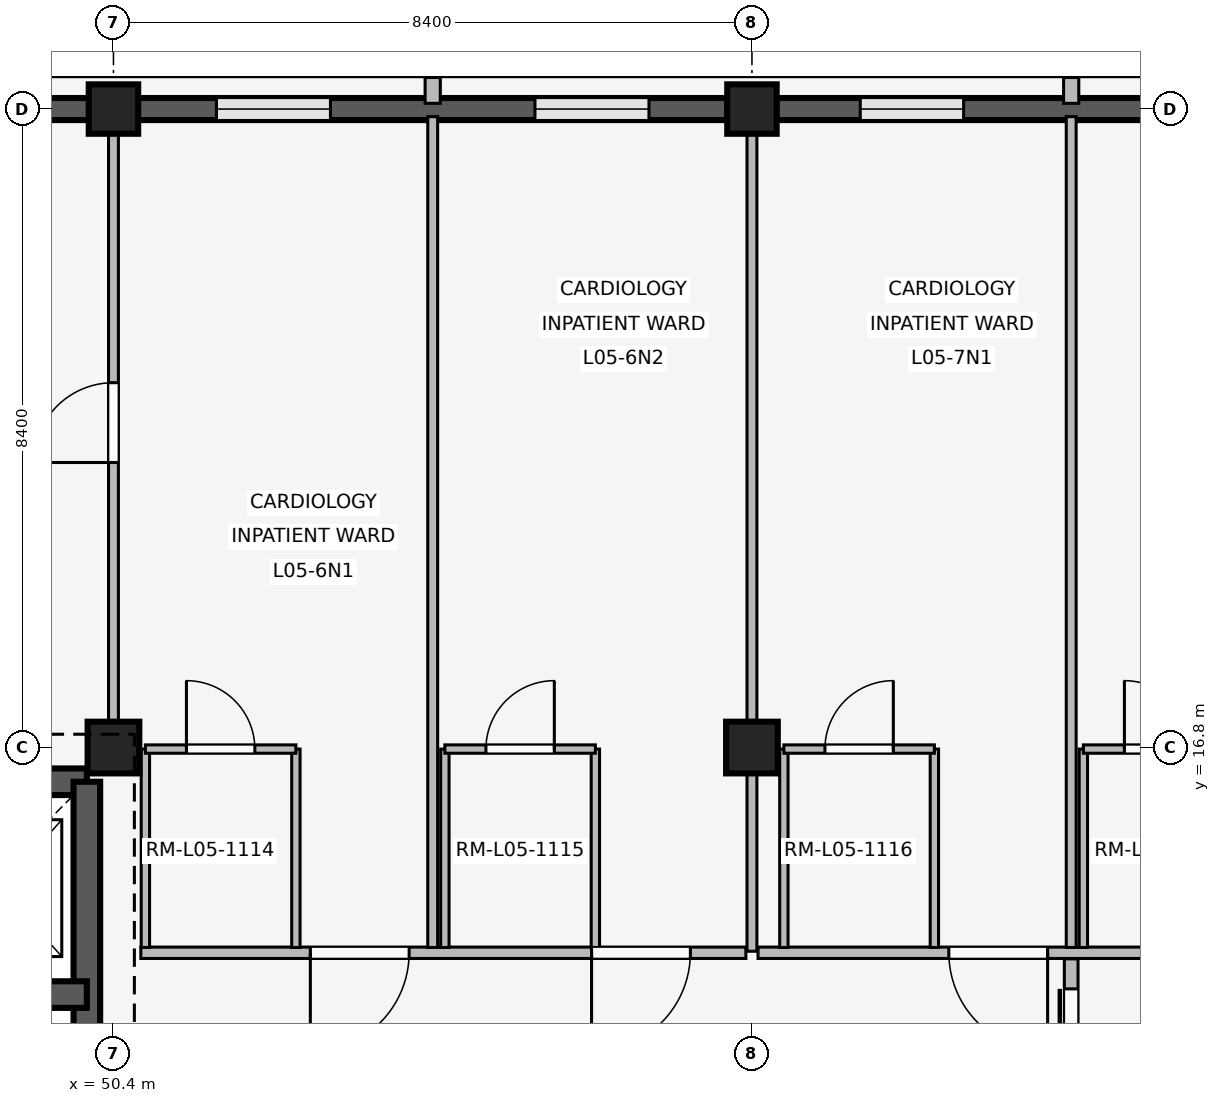
"""IFC4 building model, lengths in metres.
Left out: names, types, materials, properties, quantities, classifications, styles, units other than length and angle.
Written with IfcOpenShell. Run it as: python <this file> out.ifc"""

import sys

from ifc_helpers import new_model, si_unit, direction, frame, frame_2d, origin, origin_2d, place, context, subcontext, project, spatial, rectangle, extrude, element, fill, save


model = new_model("IFC4")
c1 = context("Model", 3, precision=1e-05, world=origin(), true_north=direction((0.0, 1.0)))
c2 = subcontext(c1, "Body", "Model", "MODEL_VIEW")
j1 = project(units=[si_unit("LENGTHUNIT", "METRE"), si_unit("PLANEANGLEUNIT", "RADIAN")], contexts=[c1])
p1 = place(None, origin())
s1 = spatial("IfcSite", under=j1, at=p1, CompositionType="ELEMENT")
p2 = place(p1, origin())
s2 = spatial("IfcBuilding", under=s1, at=p2, CompositionType="ELEMENT")
p3 = place(p2, frame((0.0, 0.0, 20.4)))
s3 = spatial("IfcBuildingStorey", under=s2, at=p3, CompositionType="ELEMENT", Elevation=20.4)
p4 = place(p3, frame((50.4, 16.8, 0.0), z_axis=(0.0, 0.0, 1.0), x_axis=(1.0, 0.0, 0.0)))
e1 = element("IfcColumn", 1, at=p4, inside=s3, PredefinedType="COLUMN", context=c2, shape_type="SweptSolid", body=[
    extrude(rectangle(XDim=0.68, YDim=0.68, at=origin_2d()), origin(), (0.0, 0.0, 1.0), 4.2),
])
p5 = place(p3, frame((50.4, 25.2, 0.0), z_axis=(0.0, 0.0, 1.0), x_axis=(1.0, 0.0, 0.0)))
e2 = element("IfcColumn", 2, at=p5, inside=s3, PredefinedType="COLUMN", context=c2, shape_type="SweptSolid", body=[
    extrude(rectangle(XDim=0.65, YDim=0.65, at=origin_2d()), origin(), (0.0, 0.0, 1.0), 4.2),
])
p6 = place(p3, frame((58.8, 16.8, 0.0), z_axis=(0.0, 0.0, 1.0), x_axis=(1.0, 0.0, 0.0)))
e3 = element("IfcColumn", 3, at=p6, inside=s3, PredefinedType="COLUMN", context=c2, shape_type="SweptSolid", body=[
    extrude(rectangle(XDim=0.68, YDim=0.68, at=origin_2d()), origin(), (0.0, 0.0, 1.0), 4.2),
])
p7 = place(p3, frame((58.8, 25.2, 0.0), z_axis=(0.0, 0.0, 1.0), x_axis=(1.0, 0.0, 0.0)))
e4 = element("IfcColumn", 4, at=p7, inside=s3, PredefinedType="COLUMN", context=c2, shape_type="SweptSolid", body=[
    extrude(rectangle(XDim=0.65, YDim=0.65, at=origin_2d()), origin(), (0.0, 0.0, 1.0), 4.2),
])
p8 = place(p3, frame((42.32, 25.2, 0.0), z_axis=(0.0, 0.0, 1.0), x_axis=(1.0, 0.0, 0.0)))
e5 = element("IfcWall", 5, at=p8, inside=s3, PredefinedType="SOLIDWALL", context=c2, shape_type="SweptSolid", body=[
    extrude(rectangle(XDim=7.76, YDim=0.29, at=frame_2d((3.88, 0.0))), origin(), (0.0, 0.0, 1.0), 3.34),
])
p9 = place(p8, frame((1.085, 0.0, 0.85)))
e6 = element("IfcOpeningElement", 6, at=p9, cuts=e5, PredefinedType="OPENING", context=c2, shape_type="SweptSolid", body=[
    extrude(rectangle(XDim=1.4, YDim=1.4, at=frame_2d((0.7, 0.7))), frame((0.0, 0.155, 0.0), z_axis=(0.0, -1.0, 0.0), x_axis=(1.0, 0.0, 0.0)), (0.0, 0.0, 1.0), 0.31),
])
p10 = place(p8, frame((5.275, 0.0, 0.85)))
e7 = element("IfcOpeningElement", 7, at=p10, cuts=e5, PredefinedType="OPENING", context=c2, shape_type="SweptSolid", body=[
    extrude(rectangle(XDim=1.4, YDim=1.4, at=frame_2d((0.7, 0.7))), frame((0.0, 0.155, 0.0), z_axis=(0.0, -1.0, 0.0), x_axis=(1.0, 0.0, 0.0)), (0.0, 0.0, 1.0), 0.31),
])
p11 = place(p3, frame((50.72, 25.2, 0.0), z_axis=(0.0, 0.0, 1.0), x_axis=(1.0, 0.0, 0.0)))
e8 = element("IfcWall", 8, at=p11, inside=s3, PredefinedType="SOLIDWALL", context=c2, shape_type="SweptSolid", body=[
    extrude(rectangle(XDim=7.76, YDim=0.29, at=frame_2d((3.88, 0.0))), origin(), (0.0, 0.0, 1.0), 3.34),
])
p12 = place(p11, frame((1.035, 0.0, 0.85)))
e9 = element("IfcOpeningElement", 9, at=p12, cuts=e8, PredefinedType="OPENING", context=c2, shape_type="SweptSolid", body=[
    extrude(rectangle(XDim=1.5, YDim=1.55, at=frame_2d((0.75, 0.775))), frame((0.0, 0.155, 0.0), z_axis=(0.0, -1.0, 0.0), x_axis=(1.0, 0.0, 0.0)), (0.0, 0.0, 1.0), 0.31),
])
p13 = place(p11, frame((5.225, 0.0, 0.85)))
e10 = element("IfcOpeningElement", 10, at=p13, cuts=e8, PredefinedType="OPENING", context=c2, shape_type="SweptSolid", body=[
    extrude(rectangle(XDim=1.5, YDim=1.55, at=frame_2d((0.75, 0.775))), frame((0.0, 0.155, 0.0), z_axis=(0.0, -1.0, 0.0), x_axis=(1.0, 0.0, 0.0)), (0.0, 0.0, 1.0), 0.31),
])
p14 = place(p3, frame((54.6, 25.275, 0.0), z_axis=(0.0, 0.0, 1.0), x_axis=(0.0, 1.0, 0.0)))
e11 = element("IfcWall", 11, at=p14, inside=s3, PredefinedType="ELEMENTEDWALL", context=c2, shape_type="SweptSolid", body=[
    extrude(rectangle(XDim=0.34, YDim=0.2, at=frame_2d((0.17, 0.0))), origin(), (0.0, 0.0, 1.0), 3.32),
])
p15 = place(p3, frame((59.12, 25.2, 0.0), z_axis=(0.0, 0.0, 1.0), x_axis=(1.0, 0.0, 0.0)))
e12 = element("IfcWall", 12, at=p15, inside=s3, PredefinedType="SOLIDWALL", context=c2, shape_type="SweptSolid", body=[
    extrude(rectangle(XDim=7.76, YDim=0.29, at=frame_2d((3.88, 0.0))), origin(), (0.0, 0.0, 1.0), 3.34),
])
p16 = place(p15, frame((1.105, 0.0, 0.85)))
e13 = element("IfcOpeningElement", 13, at=p16, cuts=e12, PredefinedType="OPENING", context=c2, shape_type="SweptSolid", body=[
    extrude(rectangle(XDim=1.36, YDim=1.42, at=frame_2d((0.68, 0.71))), frame((0.0, 0.155, 0.0), z_axis=(0.0, -1.0, 0.0), x_axis=(1.0, 0.0, 0.0)), (0.0, 0.0, 1.0), 0.31),
])
p17 = place(p15, frame((5.295, 0.0, 0.85)))
e14 = element("IfcOpeningElement", 14, at=p17, cuts=e12, PredefinedType="OPENING", context=c2, shape_type="SweptSolid", body=[
    extrude(rectangle(XDim=1.36, YDim=1.42, at=frame_2d((0.68, 0.71))), frame((0.0, 0.155, 0.0), z_axis=(0.0, -1.0, 0.0), x_axis=(1.0, 0.0, 0.0)), (0.0, 0.0, 1.0), 0.31),
])
p18 = place(p3, frame((63.0, 25.275, 0.0), z_axis=(0.0, 0.0, 1.0), x_axis=(0.0, 1.0, 0.0)))
e15 = element("IfcWall", 15, at=p18, inside=s3, PredefinedType="ELEMENTEDWALL", context=c2, shape_type="SweptSolid", body=[
    extrude(rectangle(XDim=0.34, YDim=0.2, at=frame_2d((0.17, 0.0))), origin(), (0.0, 0.0, 1.0), 3.32),
])
p19 = place(p3, frame((42.55, 16.35, 0.0), z_axis=(0.0, 0.0, 1.0), x_axis=(1.0, 0.0, 0.0)))
e16 = element("IfcWall", 16, at=p19, inside=s3, PredefinedType="SHEAR", context=c2, shape_type="SweptSolid", body=[
    extrude(rectangle(XDim=7.5, YDim=0.35, at=frame_2d((3.75, 0.0))), origin(), (0.0, 0.0, 1.0), 3.92),
])
p20 = place(p3, frame((50.05, 8.8, 0.0), z_axis=(0.0, 0.0, 1.0), x_axis=(0.0, 1.0, 0.0)))
e17 = element("IfcWall", 17, at=p20, inside=s3, PredefinedType="SHEAR", context=c2, shape_type="SweptSolid", body=[
    extrude(rectangle(XDim=7.55, YDim=0.35, at=frame_2d((3.775, 0.0))), origin(), (0.0, 0.0, 1.0), 3.92),
])
p21 = place(p20, frame((2.4, 0.0, 0.0)))
e18 = element("IfcOpeningElement", 18, at=p21, cuts=e17, PredefinedType="OPENING", context=c2, shape_type="SweptSolid", body=[
    extrude(rectangle(XDim=1.2, YDim=2.2, at=frame_2d((0.6, 1.1))), frame((0.0, 0.185, 0.0), z_axis=(0.0, -1.0, 0.0), x_axis=(1.0, 0.0, 0.0)), (0.0, 0.0, 1.0), 0.37),
])
p22 = place(p3, frame((46.25, 13.55, 0.0), z_axis=(0.0, 0.0, 1.0), x_axis=(1.0, 0.0, 0.0)))
e19 = element("IfcWall", 19, at=p22, inside=s3, PredefinedType="SHEAR", context=c2, shape_type="SweptSolid", body=[
    extrude(rectangle(XDim=3.8, YDim=0.35, at=frame_2d((1.9, 0.0))), origin(), (0.0, 0.0, 1.0), 3.92),
])
p23 = place(p22, frame((0.32, 0.0, 0.0)))
e20 = element("IfcOpeningElement", 20, at=p23, cuts=e19, PredefinedType="OPENING", context=c2, shape_type="SweptSolid", body=[
    extrude(rectangle(XDim=1.4, YDim=2.25, at=frame_2d((0.7, 1.125))), frame((0.0, 0.185, 0.0), z_axis=(0.0, -1.0, 0.0), x_axis=(1.0, 0.0, 0.0)), (0.0, 0.0, 1.0), 0.37),
])
p24 = place(p22, frame((2.04, 0.0, 0.0)))
e21 = element("IfcOpeningElement", 21, at=p24, cuts=e19, PredefinedType="OPENING", context=c2, shape_type="SweptSolid", body=[
    extrude(rectangle(XDim=1.1, YDim=2.15, at=frame_2d((0.55, 1.075))), frame((0.0, 0.185, 0.0), z_axis=(0.0, -1.0, 0.0), x_axis=(1.0, 0.0, 0.0)), (0.0, 0.0, 1.0), 0.37),
])
p25 = place(p3, frame((50.4, 17.15, 0.0), z_axis=(0.0, 0.0, 1.0), x_axis=(0.0, 1.0, 0.0)))
e22 = element("IfcWall", 22, at=p25, inside=s3, PredefinedType="PARTITIONING", context=c2, shape_type="SweptSolid", body=[
    extrude(rectangle(XDim=7.91, YDim=0.13, at=frame_2d((3.955, 0.0))), origin(), (0.0, 0.0, 1.0), 3.32),
])
p26 = place(p25, frame((3.4, 0.0, 0.0)))
e23 = element("IfcOpeningElement", 23, at=p26, cuts=e22, PredefinedType="OPENING", context=c2, shape_type="SweptSolid", body=[
    extrude(rectangle(XDim=1.05, YDim=2.2, at=frame_2d((0.525, 1.1))), frame((0.0, 0.075, 0.0), z_axis=(0.0, -1.0, 0.0), x_axis=(1.0, 0.0, 0.0)), (0.0, 0.0, 1.0), 0.15),
])
p27 = place(p3, frame((58.72, 14.1, 0.0), z_axis=(0.0, 0.0, 1.0), x_axis=(-1.0, 0.0, 0.0)))
e24 = element("IfcWall", 24, at=p27, inside=s3, PredefinedType="PARTITIONING", context=c2, shape_type="SweptSolid", body=[
    extrude(rectangle(XDim=7.96, YDim=0.15, at=frame_2d((3.98, 0.0))), origin(), (0.0, 0.0, 1.0), 3.32),
])
p28 = place(p27, frame((0.73, 0.0, 0.0)))
e25 = element("IfcOpeningElement", 25, at=p28, cuts=e24, PredefinedType="OPENING", context=c2, shape_type="SweptSolid", body=[
    extrude(rectangle(XDim=1.3, YDim=2.25, at=frame_2d((0.65, 1.125))), frame((0.0, 0.085, 0.0), z_axis=(0.0, -1.0, 0.0), x_axis=(1.0, 0.0, 0.0)), (0.0, 0.0, 1.0), 0.17),
])
p29 = place(p27, frame((4.43, 0.0, 0.0)))
e26 = element("IfcOpeningElement", 26, at=p29, cuts=e24, PredefinedType="OPENING", context=c2, shape_type="SweptSolid", body=[
    extrude(rectangle(XDim=1.3, YDim=2.25, at=frame_2d((0.65, 1.125))), frame((0.0, 0.085, 0.0), z_axis=(0.0, -1.0, 0.0), x_axis=(1.0, 0.0, 0.0)), (0.0, 0.0, 1.0), 0.17),
])
p30 = place(p3, frame((54.6, 14.17, 0.0), z_axis=(0.0, 0.0, 1.0), x_axis=(0.0, 1.0, 0.0)))
e27 = element("IfcWall", 27, at=p30, inside=s3, PredefinedType="PARTITIONING", context=c2, shape_type="SweptSolid", body=[
    extrude(rectangle(XDim=10.93, YDim=0.13, at=frame_2d((5.465, 0.0))), origin(), (0.0, 0.0, 1.0), 3.32),
])
for number, where, z_axis, x_axis in (
    (28, (50.82, 14.17, 0.0), (0.0, 0.0, 1.0), (0.0, 1.0, 0.0)),
    (29, (52.8, 14.17, 0.0), (0.0, 0.0, 1.0), (0.0, 1.0, 0.0)),
):
    element("IfcWall", number, at=place(p3, frame(where, z_axis=z_axis, x_axis=x_axis)), inside=s3, PredefinedType="PARTITIONING", context=c2, shape_type="SweptSolid", body=[
        extrude(rectangle(XDim=2.61, YDim=0.11, at=frame_2d((1.305, 0.0))), origin(), (0.0, 0.0, 1.0), 3.32),
    ])
p31 = place(p3, frame((50.82, 16.78, 0.0), z_axis=(0.0, 0.0, 1.0), x_axis=(1.0, 0.0, 0.0)))
e30 = element("IfcWall", 30, at=p31, inside=s3, PredefinedType="PARTITIONING", context=c2, shape_type="SweptSolid", body=[
    extrude(rectangle(XDim=1.98, YDim=0.11, at=frame_2d((0.99, 0.0))), origin(), (0.0, 0.0, 1.0), 3.32),
])
p32 = place(p31, frame((0.54, 0.0, 0.0)))
e31 = element("IfcOpeningElement", 31, at=p32, cuts=e30, PredefinedType="OPENING", context=c2, shape_type="SweptSolid", body=[
    extrude(rectangle(XDim=0.9, YDim=2.1, at=frame_2d((0.45, 1.05))), frame((0.0, 0.065, 0.0), z_axis=(0.0, -1.0, 0.0), x_axis=(1.0, 0.0, 0.0)), (0.0, 0.0, 1.0), 0.13),
])
for number, where, z_axis, x_axis in (
    (32, (54.76, 14.17, 0.0), (0.0, 0.0, 1.0), (0.0, 1.0, 0.0)),
    (33, (56.74, 14.17, 0.0), (0.0, 0.0, 1.0), (0.0, 1.0, 0.0)),
):
    element("IfcWall", number, at=place(p3, frame(where, z_axis=z_axis, x_axis=x_axis)), inside=s3, PredefinedType="PARTITIONING", context=c2, shape_type="SweptSolid", body=[
        extrude(rectangle(XDim=2.61, YDim=0.11, at=frame_2d((1.305, 0.0))), origin(), (0.0, 0.0, 1.0), 3.32),
    ])
p33 = place(p3, frame((54.76, 16.78, 0.0), z_axis=(0.0, 0.0, 1.0), x_axis=(1.0, 0.0, 0.0)))
e34 = element("IfcWall", 34, at=p33, inside=s3, PredefinedType="PARTITIONING", context=c2, shape_type="SweptSolid", body=[
    extrude(rectangle(XDim=1.98, YDim=0.11, at=frame_2d((0.99, 0.0))), origin(), (0.0, 0.0, 1.0), 3.32),
])
p34 = place(p33, frame((0.54, 0.0, 0.0)))
e35 = element("IfcOpeningElement", 35, at=p34, cuts=e34, PredefinedType="OPENING", context=c2, shape_type="SweptSolid", body=[
    extrude(rectangle(XDim=0.9, YDim=2.1, at=frame_2d((0.45, 1.05))), frame((0.0, 0.065, 0.0), z_axis=(0.0, -1.0, 0.0), x_axis=(1.0, 0.0, 0.0)), (0.0, 0.0, 1.0), 0.13),
])
p35 = place(p3, frame((58.8, 14.12, 0.0), z_axis=(0.0, 0.0, 1.0), x_axis=(0.0, 1.0, 0.0)))
e36 = element("IfcWall", 36, at=p35, inside=s3, PredefinedType="PARTITIONING", context=c2, shape_type="SweptSolid", body=[
    extrude(rectangle(XDim=10.94, YDim=0.13, at=frame_2d((5.47, 0.0))), origin(), (0.0, 0.0, 1.0), 3.32),
])
p36 = place(p3, frame((67.12, 14.1, 0.0), z_axis=(0.0, 0.0, 1.0), x_axis=(-1.0, 0.0, 0.0)))
e37 = element("IfcWall", 37, at=p36, inside=s3, PredefinedType="PARTITIONING", context=c2, shape_type="SweptSolid", body=[
    extrude(rectangle(XDim=8.24, YDim=0.15, at=frame_2d((4.12, 0.0))), origin(), (0.0, 0.0, 1.0), 3.32),
])
p37 = place(p36, frame((0.73, 0.0, 0.0)))
e38 = element("IfcOpeningElement", 38, at=p37, cuts=e37, PredefinedType="OPENING", context=c2, shape_type="SweptSolid", body=[
    extrude(rectangle(XDim=1.3, YDim=2.25, at=frame_2d((0.65, 1.125))), frame((0.0, 0.085, 0.0), z_axis=(0.0, -1.0, 0.0), x_axis=(1.0, 0.0, 0.0)), (0.0, 0.0, 1.0), 0.17),
])
p38 = place(p36, frame((4.43, 0.0, 0.0)))
e39 = element("IfcOpeningElement", 39, at=p38, cuts=e37, PredefinedType="OPENING", context=c2, shape_type="SweptSolid", body=[
    extrude(rectangle(XDim=1.3, YDim=2.25, at=frame_2d((0.65, 1.125))), frame((0.0, 0.085, 0.0), z_axis=(0.0, -1.0, 0.0), x_axis=(1.0, 0.0, 0.0)), (0.0, 0.0, 1.0), 0.17),
])
p39 = place(p3, frame((63.0, 14.17, 0.0), z_axis=(0.0, 0.0, 1.0), x_axis=(0.0, 1.0, 0.0)))
e40 = element("IfcWall", 40, at=p39, inside=s3, PredefinedType="PARTITIONING", context=c2, shape_type="SweptSolid", body=[
    extrude(rectangle(XDim=10.93, YDim=0.13, at=frame_2d((5.465, 0.0))), origin(), (0.0, 0.0, 1.0), 3.32),
])
for number, where, z_axis, x_axis in (
    (41, (59.22, 14.17, 0.0), (0.0, 0.0, 1.0), (0.0, 1.0, 0.0)),
    (42, (61.2, 14.17, 0.0), (0.0, 0.0, 1.0), (0.0, 1.0, 0.0)),
):
    element("IfcWall", number, at=place(p3, frame(where, z_axis=z_axis, x_axis=x_axis)), inside=s3, PredefinedType="PARTITIONING", context=c2, shape_type="SweptSolid", body=[
        extrude(rectangle(XDim=2.61, YDim=0.11, at=frame_2d((1.305, 0.0))), origin(), (0.0, 0.0, 1.0), 3.32),
    ])
p40 = place(p3, frame((59.22, 16.78, 0.0), z_axis=(0.0, 0.0, 1.0), x_axis=(1.0, 0.0, 0.0)))
e43 = element("IfcWall", 43, at=p40, inside=s3, PredefinedType="PARTITIONING", context=c2, shape_type="SweptSolid", body=[
    extrude(rectangle(XDim=1.98, YDim=0.11, at=frame_2d((0.99, 0.0))), origin(), (0.0, 0.0, 1.0), 3.32),
])
p41 = place(p40, frame((0.54, 0.0, 0.0)))
e44 = element("IfcOpeningElement", 44, at=p41, cuts=e43, PredefinedType="OPENING", context=c2, shape_type="SweptSolid", body=[
    extrude(rectangle(XDim=0.9, YDim=2.1, at=frame_2d((0.45, 1.05))), frame((0.0, 0.065, 0.0), z_axis=(0.0, -1.0, 0.0), x_axis=(1.0, 0.0, 0.0)), (0.0, 0.0, 1.0), 0.13),
])
p42 = place(p3, frame((63.16, 14.17, 0.0), z_axis=(0.0, 0.0, 1.0), x_axis=(0.0, 1.0, 0.0)))
e45 = element("IfcWall", 45, at=p42, inside=s3, PredefinedType="PARTITIONING", context=c2, shape_type="SweptSolid", body=[
    extrude(rectangle(XDim=2.61, YDim=0.11, at=frame_2d((1.305, 0.0))), origin(), (0.0, 0.0, 1.0), 3.32),
])
p43 = place(p3, frame((63.16, 16.78, 0.0), z_axis=(0.0, 0.0, 1.0), x_axis=(1.0, 0.0, 0.0)))
e46 = element("IfcWall", 46, at=p43, inside=s3, PredefinedType="PARTITIONING", context=c2, shape_type="SweptSolid", body=[
    extrude(rectangle(XDim=1.98, YDim=0.11, at=frame_2d((0.99, 0.0))), origin(), (0.0, 0.0, 1.0), 3.32),
])
p44 = place(p43, frame((0.54, 0.0, 0.0)))
e47 = element("IfcOpeningElement", 47, at=p44, cuts=e46, PredefinedType="OPENING", context=c2, shape_type="SweptSolid", body=[
    extrude(rectangle(XDim=0.9, YDim=2.1, at=frame_2d((0.45, 1.05))), frame((0.0, 0.065, 0.0), z_axis=(0.0, -1.0, 0.0), x_axis=(1.0, 0.0, 0.0)), (0.0, 0.0, 1.0), 0.13),
])
p45 = place(p3, frame((63.0, 11.18, 0.0), z_axis=(0.0, 0.0, 1.0), x_axis=(0.0, 1.0, 0.0)))
e48 = element("IfcWall", 48, at=p45, inside=s3, PredefinedType="PARTITIONING", context=c2, shape_type="SweptSolid", body=[
    extrude(rectangle(XDim=2.84, YDim=0.18, at=frame_2d((1.42, 0.0))), origin(), (0.0, 0.0, 1.0), 3.32),
])
p46 = place(p45, frame((0.395, 0.0, 0.0)))
e49 = element("IfcOpeningElement", 49, at=p46, cuts=e48, PredefinedType="OPENING", context=c2, shape_type="SweptSolid", body=[
    extrude(rectangle(XDim=2.05, YDim=2.35, at=frame_2d((1.025, 1.175))), frame((0.0, 0.1, 0.0), z_axis=(0.0, -1.0, 0.0), x_axis=(1.0, 0.0, 0.0)), (0.0, 0.0, 1.0), 0.2),
])
p47 = place(p12, origin())
e50 = element("IfcWindow", 50, at=p47, inside=s3, PartitioningType="SINGLE_PANEL", PredefinedType="WINDOW", context=c2, shape_type="SweptSolid", body=[
    extrude(rectangle(XDim=1.5, YDim=1.55, at=frame_2d((0.75, 0.775))), frame((0.0, 0.03, 0.0), z_axis=(0.0, -1.0, 0.0), x_axis=(1.0, 0.0, 0.0)), (0.0, 0.0, 1.0), 0.06),
])
fill(e9, e50)
p48 = place(p13, origin())
e51 = element("IfcWindow", 51, at=p48, inside=s3, PartitioningType="SINGLE_PANEL", PredefinedType="WINDOW", context=c2, shape_type="SweptSolid", body=[
    extrude(rectangle(XDim=1.5, YDim=1.55, at=frame_2d((0.75, 0.775))), frame((0.0, 0.03, 0.0), z_axis=(0.0, -1.0, 0.0), x_axis=(1.0, 0.0, 0.0)), (0.0, 0.0, 1.0), 0.06),
])
fill(e10, e51)
p49 = place(p16, origin())
e52 = element("IfcWindow", 52, at=p49, inside=s3, PartitioningType="SINGLE_PANEL", PredefinedType="WINDOW", context=c2, shape_type="SweptSolid", body=[
    extrude(rectangle(XDim=1.36, YDim=1.42, at=frame_2d((0.68, 0.71))), frame((0.0, 0.03, 0.0), z_axis=(0.0, -1.0, 0.0), x_axis=(1.0, 0.0, 0.0)), (0.0, 0.0, 1.0), 0.06),
])
fill(e13, e52)
p50 = place(p26, origin())
e53 = element("IfcDoor", 53, at=p50, inside=s3, OperationType="SINGLE_SWING_LEFT", PredefinedType="DOOR", context=c2, shape_type="SweptSolid", body=[
    extrude(rectangle(XDim=1.05, YDim=2.2, at=frame_2d((0.525, 1.1))), frame((0.0, 0.025, 0.0), z_axis=(0.0, -1.0, 0.0), x_axis=(1.0, 0.0, 0.0)), (0.0, 0.0, 1.0), 0.05),
])
fill(e23, e53)
p51 = place(p28, origin())
e54 = element("IfcDoor", 54, at=p51, inside=s3, OperationType="SINGLE_SWING_RIGHT", PredefinedType="DOOR", context=c2, shape_type="SweptSolid", body=[
    extrude(rectangle(XDim=1.3, YDim=2.25, at=frame_2d((0.65, 1.125))), frame((0.0, 0.025, 0.0), z_axis=(0.0, -1.0, 0.0), x_axis=(1.0, 0.0, 0.0)), (0.0, 0.0, 1.0), 0.05),
])
fill(e25, e54)
p52 = place(p29, origin())
e55 = element("IfcDoor", 55, at=p52, inside=s3, OperationType="SINGLE_SWING_RIGHT", PredefinedType="DOOR", context=c2, shape_type="SweptSolid", body=[
    extrude(rectangle(XDim=1.3, YDim=2.25, at=frame_2d((0.65, 1.125))), frame((0.0, 0.025, 0.0), z_axis=(0.0, -1.0, 0.0), x_axis=(1.0, 0.0, 0.0)), (0.0, 0.0, 1.0), 0.05),
])
fill(e26, e55)
p53 = place(p32, origin())
e56 = element("IfcDoor", 56, at=p53, inside=s3, OperationType="SINGLE_SWING_LEFT", PredefinedType="DOOR", context=c2, shape_type="SweptSolid", body=[
    extrude(rectangle(XDim=0.9, YDim=2.1, at=frame_2d((0.45, 1.05))), frame((0.0, 0.025, 0.0), z_axis=(0.0, -1.0, 0.0), x_axis=(1.0, 0.0, 0.0)), (0.0, 0.0, 1.0), 0.05),
])
fill(e31, e56)
p54 = place(p34, origin())
e57 = element("IfcDoor", 57, at=p54, inside=s3, OperationType="SINGLE_SWING_RIGHT", PredefinedType="DOOR", context=c2, shape_type="SweptSolid", body=[
    extrude(rectangle(XDim=0.9, YDim=2.1, at=frame_2d((0.45, 1.05))), frame((0.0, 0.025, 0.0), z_axis=(0.0, -1.0, 0.0), x_axis=(1.0, 0.0, 0.0)), (0.0, 0.0, 1.0), 0.05),
])
fill(e35, e57)
p55 = place(p38, origin())
e58 = element("IfcDoor", 58, at=p55, inside=s3, OperationType="SINGLE_SWING_LEFT", PredefinedType="DOOR", context=c2, shape_type="SweptSolid", body=[
    extrude(rectangle(XDim=1.3, YDim=2.25, at=frame_2d((0.65, 1.125))), frame((0.0, 0.025, 0.0), z_axis=(0.0, -1.0, 0.0), x_axis=(1.0, 0.0, 0.0)), (0.0, 0.0, 1.0), 0.05),
])
fill(e39, e58)
p56 = place(p41, origin())
e59 = element("IfcDoor", 59, at=p56, inside=s3, OperationType="SINGLE_SWING_RIGHT", PredefinedType="DOOR", context=c2, shape_type="SweptSolid", body=[
    extrude(rectangle(XDim=0.9, YDim=2.1, at=frame_2d((0.45, 1.05))), frame((0.0, 0.025, 0.0), z_axis=(0.0, -1.0, 0.0), x_axis=(1.0, 0.0, 0.0)), (0.0, 0.0, 1.0), 0.05),
])
fill(e44, e59)
p57 = place(p44, origin())
e60 = element("IfcDoor", 60, at=p57, inside=s3, OperationType="SINGLE_SWING_LEFT", PredefinedType="DOOR", context=c2, shape_type="SweptSolid", body=[
    extrude(rectangle(XDim=0.9, YDim=2.1, at=frame_2d((0.45, 1.05))), frame((0.0, 0.025, 0.0), z_axis=(0.0, -1.0, 0.0), x_axis=(1.0, 0.0, 0.0)), (0.0, 0.0, 1.0), 0.05),
])
fill(e47, e60)
p58 = place(p46, origin())
e61 = element("IfcDoor", 61, at=p58, inside=s3, OperationType="SLIDING_TO_LEFT", PredefinedType="DOOR", context=c2, shape_type="SweptSolid", body=[
    extrude(rectangle(XDim=2.05, YDim=2.35, at=frame_2d((1.025, 1.175))), frame((0.0, 0.025, 0.0), z_axis=(0.0, -1.0, 0.0), x_axis=(1.0, 0.0, 0.0)), (0.0, 0.0, 1.0), 0.05),
])
fill(e49, e61)
save(model, sys.argv[1])
